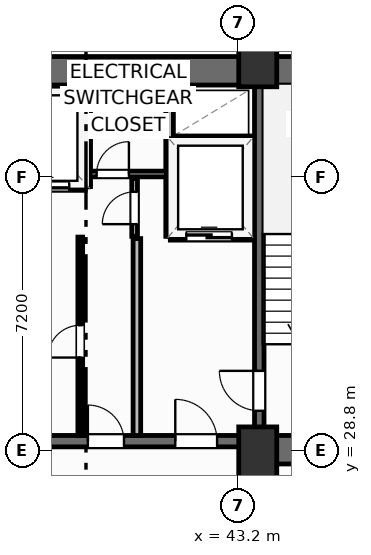
"""IFC4 building model, lengths in metres.
Left out: names, types, materials, properties, quantities, classifications, styles, units other than length and angle.
Written with IfcOpenShell. Run it as: python <this file> out.ifc"""

import sys

from ifc_helpers import new_model, si_unit, direction, frame, frame_2d, origin, origin_2d, place, context, subcontext, project, spatial, rectangle, extrude, element, fill, save


model = new_model("IFC4")
c1 = context("Model", 3, precision=1e-05, world=origin(), true_north=direction((0.0, 1.0)))
c2 = subcontext(c1, "Body", "Model", "MODEL_VIEW")
j1 = project(units=[si_unit("LENGTHUNIT", "METRE"), si_unit("PLANEANGLEUNIT", "RADIAN")], contexts=[c1])
p1 = place(None, origin())
s1 = spatial("IfcSite", under=j1, at=p1, CompositionType="ELEMENT")
p2 = place(p1, origin())
s2 = spatial("IfcBuilding", under=s1, at=p2, CompositionType="ELEMENT")
p3 = place(p2, frame((0.0, 0.0, 113.2)))
s3 = spatial("IfcBuildingStorey", under=s2, at=p3, CompositionType="ELEMENT", Elevation=113.2)
for number, where, z_axis, x_axis in (
    (1, (43.72, 28.75, 0.0), (0.0, 0.0, 1.0), (1.0, 0.0, 0.0)),
    (2, (43.72, 39.05, 0.0), (0.0, 0.0, 1.0), (1.0, 0.0, 0.0)),
):
    element("IfcColumn", number, at=place(p3, frame(where, z_axis=z_axis, x_axis=x_axis)), inside=s3, PredefinedType="COLUMN", context=c2, shape_type="SweptSolid", body=[
        extrude(rectangle(XDim=1.0, YDim=1.35, at=origin_2d()), origin(), (0.0, 0.0, 1.0), 3.7),
    ])
p4 = place(p3, frame((30.38, 38.795, 0.0), z_axis=(0.0, 0.0, 1.0), x_axis=(1.0, 0.0, 0.0)))
e3 = element("IfcWall", 3, at=p4, inside=s3, PredefinedType="SHEAR", context=c2, shape_type="SweptSolid", body=[
    extrude(rectangle(XDim=17.64, YDim=0.75, at=frame_2d((8.82, 0.0))), origin(), (0.0, 0.0, 1.0), 3.38),
])
p5 = place(p3, frame((43.6, 28.825, 0.0), z_axis=(0.0, 0.0, 1.0), x_axis=(1.0, 0.0, 0.0)))
e4 = element("IfcWall", 4, at=p5, inside=s3, PredefinedType="SHEAR", context=c2, shape_type="SweptSolid", body=[
    extrude(rectangle(XDim=4.42, YDim=0.75, at=frame_2d((2.21, 0.0))), origin(), (0.0, 0.0, 1.0), 3.38),
])
p6 = place(p3, frame((34.8, 29.05, 0.0), z_axis=(0.0, 0.0, 1.0), x_axis=(1.0, 0.0, 0.0)))
e5 = element("IfcWall", 5, at=p6, inside=s3, PredefinedType="SHEAR", context=c2, shape_type="SweptSolid", body=[
    extrude(rectangle(XDim=8.8, YDim=0.3, at=frame_2d((4.4, 0.0))), origin(), (0.0, 0.0, 1.0), 3.38),
])
p7 = place(p6, frame((0.95, 0.0, 0.0)))
e6 = element("IfcOpeningElement", 6, at=p7, cuts=e5, PredefinedType="OPENING", context=c2, shape_type="SweptSolid", body=[
    extrude(rectangle(XDim=1.1, YDim=2.15, at=frame_2d((0.55, 1.075))), frame((0.0, 0.16, 0.0), z_axis=(0.0, -1.0, 0.0), x_axis=(1.0, 0.0, 0.0)), (0.0, 0.0, 1.0), 0.32),
])
p8 = place(p6, frame((6.75, 0.0, 0.0)))
e7 = element("IfcOpeningElement", 7, at=p8, cuts=e5, PredefinedType="OPENING", context=c2, shape_type="SweptSolid", body=[
    extrude(rectangle(XDim=1.1, YDim=2.15, at=frame_2d((0.55, 1.075))), frame((0.0, 0.16, 0.0), z_axis=(0.0, -1.0, 0.0), x_axis=(1.0, 0.0, 0.0)), (0.0, 0.0, 1.0), 0.32),
])
p9 = place(p6, frame((4.45, 0.0, 0.0)))
e8 = element("IfcOpeningElement", 8, at=p9, cuts=e5, PredefinedType="OPENING", context=c2, shape_type="SweptSolid", body=[
    extrude(rectangle(XDim=0.95, YDim=2.15, at=frame_2d((0.475, 1.075))), frame((0.0, 0.16, 0.0), z_axis=(0.0, -1.0, 0.0), x_axis=(1.0, 0.0, 0.0)), (0.0, 0.0, 1.0), 0.32),
])
p10 = place(p3, frame((43.76, 29.2, 0.0), z_axis=(0.0, 0.0, 1.0), x_axis=(0.0, 1.0, 0.0)))
e9 = element("IfcWall", 9, at=p10, inside=s3, PredefinedType="SHEAR", context=c2, shape_type="SweptSolid", body=[
    extrude(rectangle(XDim=9.22, YDim=0.25, at=frame_2d((4.61, 0.0))), origin(), (0.0, 0.0, 1.0), 3.38),
])
p11 = place(p10, frame((0.65, 0.0, 0.0)))
e10 = element("IfcOpeningElement", 10, at=p11, cuts=e9, PredefinedType="OPENING", context=c2, shape_type="SweptSolid", body=[
    extrude(rectangle(XDim=1.05, YDim=2.15, at=frame_2d((0.525, 1.075))), frame((0.0, 0.135, 0.0), z_axis=(0.0, -1.0, 0.0), x_axis=(1.0, 0.0, 0.0)), (0.0, 0.0, 1.0), 0.27),
])
p12 = place(p3, frame((40.54, 29.2, 0.0), z_axis=(0.0, 0.0, 1.0), x_axis=(0.0, 1.0, 0.0)))
e11 = element("IfcWall", 11, at=p12, inside=s3, PredefinedType="PARTITIONING", context=c2, shape_type="SweptSolid", body=[
    extrude(rectangle(XDim=5.18, YDim=0.2, at=frame_2d((2.59, 0.0))), origin(), (0.0, 0.0, 1.0), 3.38),
])
p13 = place(p3, frame((41.42, 34.44, 0.0), z_axis=(0.0, 0.0, 1.0), x_axis=(1.0, 0.0, 0.0)))
e12 = element("IfcWall", 12, at=p13, inside=s3, PredefinedType="PARTITIONING", context=c2, shape_type="SweptSolid", body=[
    extrude(rectangle(XDim=2.18, YDim=0.2, at=frame_2d((1.09, 0.0))), origin(), (0.0, 0.0, 1.0), 3.38),
])
p14 = place(p13, frame((0.42, 0.0, 0.0)))
e13 = element("IfcOpeningElement", 13, at=p14, cuts=e12, PredefinedType="OPENING", context=c2, shape_type="SweptSolid", body=[
    extrude(rectangle(XDim=1.2, YDim=2.2, at=frame_2d((0.6, 1.1))), frame((0.0, 0.11, 0.0), z_axis=(0.0, -1.0, 0.0), x_axis=(1.0, 0.0, 0.0)), (0.0, 0.0, 1.0), 0.22),
])
p15 = place(p3, frame((41.42, 36.98, 0.0), z_axis=(0.0, 0.0, 1.0), x_axis=(1.0, 0.0, 0.0)))
e14 = element("IfcWall", 14, at=p15, inside=s3, PredefinedType="PARTITIONING", context=c2, shape_type="SweptSolid", body=[
    extrude(rectangle(XDim=2.18, YDim=0.2, at=frame_2d((1.09, 0.0))), origin(), (0.0, 0.0, 1.0), 3.38),
])
p16 = place(p3, frame((41.4, 34.44, 0.0), z_axis=(0.0, 0.0, 1.0), x_axis=(0.0, 1.0, 0.0)))
e15 = element("IfcWall", 15, at=p16, inside=s3, PredefinedType="PARTITIONING", context=c2, shape_type="SweptSolid", body=[
    extrude(rectangle(XDim=3.9, YDim=0.2, at=frame_2d((1.95, 0.0))), origin(), (0.0, 0.0, 1.0), 3.38),
])
p17 = place(p3, frame((37.06, 35.75, 0.0), z_axis=(0.0, 0.0, 1.0), x_axis=(1.0, 0.0, 0.0)))
e16 = element("IfcWall", 16, at=p17, inside=s3, PredefinedType="PARTITIONING", context=c2, shape_type="SweptSolid", body=[
    extrude(rectangle(XDim=2.12, YDim=0.2, at=frame_2d((1.06, 0.0))), origin(), (0.0, 0.0, 1.0), 3.38),
])
p18 = place(p17, frame((0.4, 0.0, 0.0)))
e17 = element("IfcOpeningElement", 17, at=p18, cuts=e16, PredefinedType="OPENING", context=c2, shape_type="SweptSolid", body=[
    extrude(rectangle(XDim=1.3, YDim=2.2, at=frame_2d((0.65, 1.1))), frame((0.0, 0.11, 0.0), z_axis=(0.0, -1.0, 0.0), x_axis=(1.0, 0.0, 0.0)), (0.0, 0.0, 1.0), 0.22),
])
p19 = place(p3, frame((39.22, 35.75, 0.0), z_axis=(0.0, 0.0, 1.0), x_axis=(0.0, 1.0, 0.0)))
e18 = element("IfcWall", 18, at=p19, inside=s3, PredefinedType="PARTITIONING", context=c2, shape_type="SweptSolid", body=[
    extrude(rectangle(XDim=2.59, YDim=0.2, at=frame_2d((1.295, 0.0))), origin(), (0.0, 0.0, 1.0), 3.38),
])
p20 = place(p3, frame((39.3, 36.08, 0.0), z_axis=(0.0, 0.0, 1.0), x_axis=(1.0, 0.0, 0.0)))
e19 = element("IfcWall", 19, at=p20, inside=s3, PredefinedType="PARTITIONING", context=c2, shape_type="SweptSolid", body=[
    extrude(rectangle(XDim=2.02, YDim=0.15, at=frame_2d((1.01, 0.0))), origin(), (0.0, 0.0, 1.0), 3.38),
])
p21 = place(p20, frame((0.18, 0.0, 0.0)))
e20 = element("IfcOpeningElement", 20, at=p21, cuts=e19, PredefinedType="OPENING", context=c2, shape_type="SweptSolid", body=[
    extrude(rectangle(XDim=0.85, YDim=2.05, at=frame_2d((0.425, 1.025))), frame((0.0, 0.085, 0.0), z_axis=(0.0, -1.0, 0.0), x_axis=(1.0, 0.0, 0.0)), (0.0, 0.0, 1.0), 0.17),
])
p22 = place(p3, frame((40.48, 34.44, 0.0), z_axis=(0.0, 0.0, 1.0), x_axis=(0.0, 1.0, 0.0)))
e21 = element("IfcWall", 21, at=p22, inside=s3, PredefinedType="PARTITIONING", context=c2, shape_type="SweptSolid", body=[
    extrude(rectangle(XDim=1.52, YDim=0.15, at=frame_2d((0.76, 0.0))), origin(), (0.0, 0.0, 1.0), 3.38),
])
p23 = place(p22, frame((0.32, 0.0, 0.0)))
e22 = element("IfcOpeningElement", 22, at=p23, cuts=e21, PredefinedType="OPENING", context=c2, shape_type="SweptSolid", body=[
    extrude(rectangle(XDim=0.85, YDim=2.05, at=frame_2d((0.425, 1.025))), frame((0.0, 0.085, 0.0), z_axis=(0.0, -1.0, 0.0), x_axis=(1.0, 0.0, 0.0)), (0.0, 0.0, 1.0), 0.17),
])
p24 = place(p3, frame((39.05, 29.2, 0.0), z_axis=(0.0, 0.0, 1.0), x_axis=(0.0, 1.0, 0.0)))
e23 = element("IfcWall", 23, at=p24, inside=s3, PredefinedType="PARTITIONING", context=c2, shape_type="SweptSolid", body=[
    extrude(rectangle(XDim=5.22, YDim=0.125, at=frame_2d((2.61, 0.0))), origin(), (0.0, 0.0, 1.0), 3.38),
])
p25 = place(p24, frame((2.05, 0.0, 0.0)))
e24 = element("IfcOpeningElement", 24, at=p25, cuts=e23, PredefinedType="OPENING", context=c2, shape_type="SweptSolid", body=[
    extrude(rectangle(XDim=0.85, YDim=2.05, at=frame_2d((0.425, 1.025))), frame((0.0, 0.073, 0.0), z_axis=(0.0, -1.0, 0.0), x_axis=(1.0, 0.0, 0.0)), (0.0, 0.0, 1.0), 0.145),
])
p26 = place(p11, origin())
e25 = element("IfcDoor", 25, at=p26, inside=s3, OperationType="SINGLE_SWING_RIGHT", PredefinedType="DOOR", context=c2, shape_type="SweptSolid", body=[
    extrude(rectangle(XDim=1.05, YDim=2.15, at=frame_2d((0.525, 1.075))), frame((0.0, 0.025, 0.0), z_axis=(0.0, -1.0, 0.0), x_axis=(1.0, 0.0, 0.0)), (0.0, 0.0, 1.0), 0.05),
])
fill(e10, e25)
p27 = place(p8, origin())
e26 = element("IfcDoor", 26, at=p27, inside=s3, OperationType="SINGLE_SWING_LEFT", PredefinedType="DOOR", context=c2, shape_type="SweptSolid", body=[
    extrude(rectangle(XDim=1.1, YDim=2.15, at=frame_2d((0.55, 1.075))), frame((0.0, 0.025, 0.0), z_axis=(0.0, -1.0, 0.0), x_axis=(1.0, 0.0, 0.0)), (0.0, 0.0, 1.0), 0.05),
])
fill(e7, e26)
p28 = place(p14, origin())
e27 = element("IfcDoor", 27, at=p28, inside=s3, OperationType="SLIDING_TO_LEFT", PredefinedType="DOOR", context=c2, shape_type="SweptSolid", body=[
    extrude(rectangle(XDim=1.2, YDim=2.2, at=frame_2d((0.6, 1.1))), frame((0.0, 0.025, 0.0), z_axis=(0.0, -1.0, 0.0), x_axis=(1.0, 0.0, 0.0)), (0.0, 0.0, 1.0), 0.05),
])
fill(e13, e27)
p29 = place(p18, origin())
e28 = element("IfcDoor", 28, at=p29, inside=s3, OperationType="SLIDING_TO_LEFT", PredefinedType="DOOR", context=c2, shape_type="SweptSolid", body=[
    extrude(rectangle(XDim=1.3, YDim=2.2, at=frame_2d((0.65, 1.1))), frame((0.0, 0.025, 0.0), z_axis=(0.0, -1.0, 0.0), x_axis=(1.0, 0.0, 0.0)), (0.0, 0.0, 1.0), 0.05),
])
fill(e17, e28)
p30 = place(p21, origin())
e29 = element("IfcDoor", 29, at=p30, inside=s3, OperationType="SINGLE_SWING_RIGHT", PredefinedType="DOOR", context=c2, shape_type="SweptSolid", body=[
    extrude(rectangle(XDim=0.85, YDim=2.05, at=frame_2d((0.425, 1.025))), frame((0.0, 0.025, 0.0), z_axis=(0.0, -1.0, 0.0), x_axis=(1.0, 0.0, 0.0)), (0.0, 0.0, 1.0), 0.05),
])
fill(e20, e29)
p31 = place(p23, origin())
e30 = element("IfcDoor", 30, at=p31, inside=s3, OperationType="SINGLE_SWING_LEFT", PredefinedType="DOOR", context=c2, shape_type="SweptSolid", body=[
    extrude(rectangle(XDim=0.85, YDim=2.05, at=frame_2d((0.425, 1.025))), frame((0.0, 0.025, 0.0), z_axis=(0.0, -1.0, 0.0), x_axis=(1.0, 0.0, 0.0)), (0.0, 0.0, 1.0), 0.05),
])
fill(e22, e30)
p32 = place(p25, origin())
e31 = element("IfcDoor", 31, at=p32, inside=s3, OperationType="SINGLE_SWING_LEFT", PredefinedType="DOOR", context=c2, shape_type="SweptSolid", body=[
    extrude(rectangle(XDim=0.85, YDim=2.05, at=frame_2d((0.425, 1.025))), frame((0.0, 0.025, 0.0), z_axis=(0.0, -1.0, 0.0), x_axis=(1.0, 0.0, 0.0)), (0.0, 0.0, 1.0), 0.05),
])
fill(e24, e31)
p33 = place(p9, origin())
e32 = element("IfcDoor", 32, at=p33, inside=s3, OperationType="SINGLE_SWING_LEFT", PredefinedType="DOOR", context=c2, shape_type="SweptSolid", body=[
    extrude(rectangle(XDim=0.95, YDim=2.15, at=frame_2d((0.475, 1.075))), frame((0.0, 0.025, 0.0), z_axis=(0.0, -1.0, 0.0), x_axis=(1.0, 0.0, 0.0)), (0.0, 0.0, 1.0), 0.05),
])
fill(e8, e32)
save(model, sys.argv[1])
